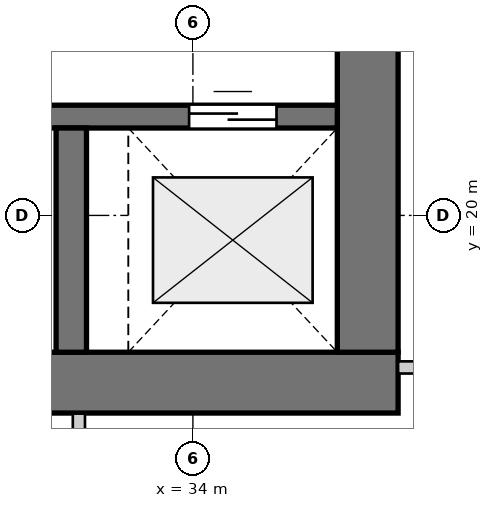
"""IFC4 building model, lengths in metres.
Left out: names, types, materials, properties, quantities, classifications, styles, units other than length and angle.
Written with IfcOpenShell. Run it as: python <this file> out.ifc"""

import sys

from ifc_helpers import new_model, si_unit, direction, frame, frame_2d, origin, place, context, subcontext, project, spatial, rectangle, extrude, source, transform, mapped, element, fill, save


model = new_model("IFC4")
c1 = context("Model", 3, precision=1e-05, world=origin(), true_north=direction((0.0, 1.0)))
c2 = subcontext(c1, "Body", "Model", "MODEL_VIEW")
j1 = project(units=[si_unit("LENGTHUNIT", "METRE"), si_unit("PLANEANGLEUNIT", "RADIAN")], contexts=[c1])
p1 = place(None, origin())
s1 = spatial("IfcSite", under=j1, at=p1, CompositionType="ELEMENT")
p2 = place(p1, origin())
s2 = spatial("IfcBuilding", under=s1, at=p2, CompositionType="ELEMENT")
p3 = place(p2, frame((0.0, 0.0, -4.2)))
s3 = spatial("IfcBuildingStorey", under=s2, at=p3, CompositionType="ELEMENT", Elevation=-4.2)
p4 = place(p3, frame((24.0, 17.8, 0.0), z_axis=(0.0, 0.0, 1.0), x_axis=(1.0, 0.0, 0.0)))
e1 = element("IfcWall", 1, at=p4, inside=s3, PredefinedType="SHEAR", context=c2, shape_type="SweptSolid", body=[
    extrude(rectangle(XDim=12.7, YDim=0.8, at=frame_2d((6.35, 0.0))), origin(), (0.0, 0.0, 1.0), 3.9),
])
p5 = place(p3, frame((36.3, 18.2, 0.0), z_axis=(0.0, 0.0, 1.0), x_axis=(0.0, 1.0, 0.0)))
e2 = element("IfcWall", 2, at=p5, inside=s3, PredefinedType="SHEAR", context=c2, shape_type="SweptSolid", body=[
    extrude(rectangle(XDim=15.6, YDim=0.8, at=frame_2d((7.8, 0.0))), origin(), (0.0, 0.0, 1.0), 3.9),
])
p6 = place(p5, frame((4.25, 0.0, 0.0)))
e3 = element("IfcOpeningElement", 3, at=p6, cuts=e2, PredefinedType="OPENING", context=c2, shape_type="SweptSolid", body=[
    extrude(rectangle(XDim=1.1, YDim=2.15, at=frame_2d((0.55, 1.075))), frame((0.0, 0.41, 0.0), z_axis=(0.0, -1.0, 0.0), x_axis=(1.0, 0.0, 0.0)), (0.0, 0.0, 1.0), 0.82),
])
p7 = place(p5, frame((10.25, 0.0, 0.0)))
e4 = element("IfcOpeningElement", 4, at=p7, cuts=e2, PredefinedType="OPENING", context=c2, shape_type="SweptSolid", body=[
    extrude(rectangle(XDim=1.1, YDim=2.15, at=frame_2d((0.55, 1.075))), frame((0.0, 0.41, 0.0), z_axis=(0.0, -1.0, 0.0), x_axis=(1.0, 0.0, 0.0)), (0.0, 0.0, 1.0), 0.82),
])
p8 = place(p3, frame((24.8, 21.3, 0.0), z_axis=(0.0, 0.0, 1.0), x_axis=(1.0, 0.0, 0.0)))
e5 = element("IfcWall", 5, at=p8, inside=s3, PredefinedType="SHEAR", context=c2, shape_type="SweptSolid", body=[
    extrude(rectangle(XDim=11.1, YDim=0.3, at=frame_2d((5.55, 0.0))), origin(), (0.0, 0.0, 1.0), 3.9),
])
p9 = place(p8, frame((6.22, 0.0, 0.0)))
e6 = element("IfcOpeningElement", 6, at=p9, cuts=e5, PredefinedType="OPENING", context=c2, shape_type="SweptSolid", body=[
    extrude(rectangle(XDim=0.98, YDim=2.15, at=frame_2d((0.49, 1.075))), frame((0.0, 0.16, 0.0), z_axis=(0.0, -1.0, 0.0), x_axis=(1.0, 0.0, 0.0)), (0.0, 0.0, 1.0), 0.32),
])
p10 = place(p8, frame((9.15, 0.0, 0.0)))
e7 = element("IfcOpeningElement", 7, at=p10, cuts=e5, PredefinedType="OPENING", context=c2, shape_type="SweptSolid", body=[
    extrude(rectangle(XDim=1.15, YDim=2.15, at=frame_2d((0.575, 1.075))), frame((0.0, 0.16, 0.0), z_axis=(0.0, -1.0, 0.0), x_axis=(1.0, 0.0, 0.0)), (0.0, 0.0, 1.0), 0.32),
])
p11 = place(p3, frame((32.4, 18.2, 0.0), z_axis=(0.0, 0.0, 1.0), x_axis=(0.0, 1.0, 0.0)))
e8 = element("IfcWall", 8, at=p11, inside=s3, PredefinedType="SHEAR", context=c2, shape_type="SweptSolid", body=[
    extrude(rectangle(XDim=2.95, YDim=0.4, at=frame_2d((1.475, 0.0))), origin(), (0.0, 0.0, 1.0), 3.9),
])
p12 = place(p3, frame((32.5, 15.588, 0.0), z_axis=(0.0, 0.0, 1.0), x_axis=(0.0, 1.0, 0.0)))
e9 = element("IfcWall", 9, at=p12, inside=s3, PredefinedType="PARTITIONING", context=c2, shape_type="SweptSolid", body=[
    extrude(rectangle(XDim=1.804, YDim=0.16, at=frame_2d((0.902, 0.0))), origin(), (0.0, 0.0, 1.0), 3.9),
])
p13 = place(p3, frame((36.7, 18.0, 0.0), z_axis=(0.0, 0.0, 1.0), x_axis=(1.0, 0.0, 0.0)))
e10 = element("IfcWall", 10, at=p13, inside=s3, PredefinedType="PARTITIONING", context=c2, shape_type="SweptSolid", body=[
    extrude(rectangle(XDim=9.7, YDim=0.16, at=frame_2d((4.85, 0.0))), origin(), (0.0, 0.0, 1.0), 3.9),
])
m1 = source(origin(), c2, "Body", "SweptSolid", [
    extrude(rectangle(XDim=1.15, YDim=2.15, at=frame_2d((0.575, 1.075))), frame((0.0, 0.025, 0.0), z_axis=(0.0, -1.0, 0.0), x_axis=(1.0, 0.0, 0.0)), (0.0, 0.0, 1.0), 0.05),
])
p14 = place(p10, origin())
e11 = element("IfcDoor", 11, at=p14, inside=s3, OperationType="DOUBLE_DOOR_SLIDING", PredefinedType="DOOR", context=c2, shape_type="MappedRepresentation", body=[
    mapped(m1, transform((0.0, 0.0, 0.0), x_axis=(1.0, 0.0, 0.0), y_axis=(0.0, 1.0, 0.0), z_axis=(0.0, 0.0, 1.0), scale=1.0)),
])
fill(e7, e11)
save(model, sys.argv[1])
